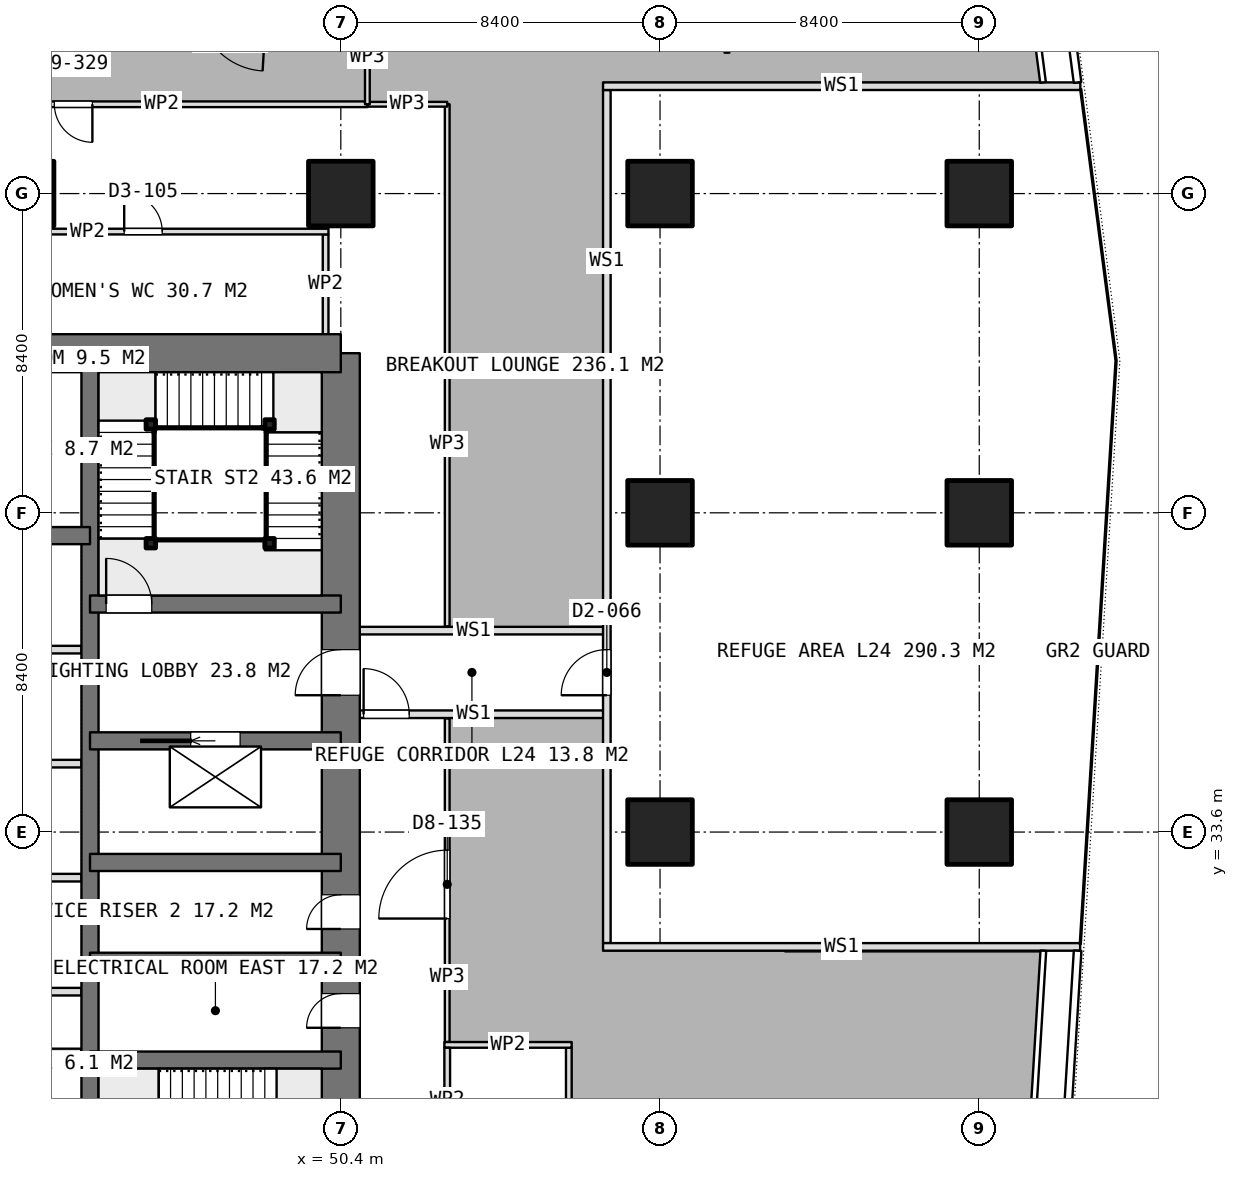
"""IFC4 building model, lengths in metres.
Left out: names, types, materials, properties, quantities, classifications, styles, units other than length and angle.
Written with IfcOpenShell. Run it as: python <this file> out.ifc"""

import sys

from ifc_helpers import new_model, si_unit, direction, frame, frame_2d, origin, origin_2d, place, context, subcontext, project, spatial, rectangle, extrude, element, fill, save


model = new_model("IFC4")
c1 = context("Model", 3, precision=1e-05, world=origin(), true_north=direction((0.0, 1.0)))
c2 = subcontext(c1, "Body", "Model", "MODEL_VIEW")
j1 = project(units=[si_unit("LENGTHUNIT", "METRE"), si_unit("PLANEANGLEUNIT", "RADIAN")], contexts=[c1])
p1 = place(None, origin())
s1 = spatial("IfcSite", under=j1, at=p1, CompositionType="ELEMENT")
p2 = place(p1, origin())
s2 = spatial("IfcBuilding", under=s1, at=p2, CompositionType="ELEMENT")
p3 = place(p2, frame((0.0, 0.0, 99.05)))
s3 = spatial("IfcBuildingStorey", under=s2, at=p3, CompositionType="ELEMENT", Elevation=99.05)
p4 = place(p3, frame((40.0, 46.2, 0.0), z_axis=(0.0, 0.0, 1.0), x_axis=(1.0, 0.0, 0.0)))
e1 = element("IfcWall", 1, at=p4, inside=s3, PredefinedType="SHEAR", context=c2, shape_type="SweptSolid", body=[
    extrude(rectangle(XDim=10.4, YDim=1.0, at=frame_2d((5.2, 0.0))), origin(), (0.0, 0.0, 1.0), 3.75),
])
p5 = place(p3, frame((50.4, 21.0, 0.0), z_axis=(0.0, 0.0, 1.0), x_axis=(0.0, 1.0, 0.0)))
e2 = element("IfcWall", 2, at=p5, inside=s3, PredefinedType="SHEAR", context=c2, shape_type="SweptSolid", body=[
    extrude(rectangle(XDim=25.2, YDim=1.0, at=frame_2d((12.6, 0.0))), origin(), (0.0, 0.0, 1.0), 3.75),
])
p6 = place(p5, frame((16.2, 0.0, 0.0)))
e3 = element("IfcOpeningElement", 3, at=p6, cuts=e2, PredefinedType="OPENING", context=c2, shape_type="SweptSolid", body=[
    extrude(rectangle(XDim=1.2, YDim=2.1, at=frame_2d((0.6, 1.05))), frame((0.0, 0.51, 0.0), z_axis=(0.0, -1.0, 0.0), x_axis=(1.0, 0.0, 0.0)), (0.0, 0.0, 1.0), 1.02),
])
p7 = place(p5, frame((10.05, 0.0, 0.0)))
e4 = element("IfcOpeningElement", 4, at=p7, cuts=e2, PredefinedType="OPENING", context=c2, shape_type="SweptSolid", body=[
    extrude(rectangle(XDim=0.9, YDim=2.1, at=frame_2d((0.45, 1.05))), frame((0.0, 0.51, 0.0), z_axis=(0.0, -1.0, 0.0), x_axis=(1.0, 0.0, 0.0)), (0.0, 0.0, 1.0), 1.02),
])
p8 = place(p5, frame((7.45, 0.0, 0.0)))
e5 = element("IfcOpeningElement", 5, at=p8, cuts=e2, PredefinedType="OPENING", context=c2, shape_type="SweptSolid", body=[
    extrude(rectangle(XDim=0.9, YDim=2.1, at=frame_2d((0.45, 1.05))), frame((0.0, 0.51, 0.0), z_axis=(0.0, -1.0, 0.0), x_axis=(1.0, 0.0, 0.0)), (0.0, 0.0, 1.0), 1.02),
])
p9 = place(p5, frame((0.7, 0.0, 0.0)))
e6 = element("IfcOpeningElement", 6, at=p9, cuts=e2, PredefinedType="OPENING", context=c2, shape_type="SweptSolid", body=[
    extrude(rectangle(XDim=1.2, YDim=2.1, at=frame_2d((0.6, 1.05))), frame((0.0, 0.51, 0.0), z_axis=(0.0, -1.0, 0.0), x_axis=(1.0, 0.0, 0.0)), (0.0, 0.0, 1.0), 1.02),
])
p10 = place(p3, frame((43.8, 21.0, 0.0), z_axis=(0.0, 0.0, 1.0), x_axis=(0.0, 1.0, 0.0)))
e7 = element("IfcWall", 7, at=p10, inside=s3, PredefinedType="SHEAR", context=c2, shape_type="SweptSolid", body=[
    extrude(rectangle(XDim=25.2, YDim=0.45, at=frame_2d((12.6, 0.0))), origin(), (0.0, 0.0, 1.0), 3.75),
])
p11 = place(p3, frame((40.0, 41.4, 0.0), z_axis=(0.0, 0.0, 1.0), x_axis=(1.0, 0.0, 0.0)))
e8 = element("IfcWall", 8, at=p11, inside=s3, PredefinedType="SHEAR", context=c2, shape_type="SweptSolid", body=[
    extrude(rectangle(XDim=3.8, YDim=0.45, at=frame_2d((1.9, 0.0))), origin(), (0.0, 0.0, 1.0), 3.75),
])
for number, where, z_axis, x_axis in (
    (9, (43.8, 27.6, 0.0), (0.0, 0.0, 1.0), (1.0, 0.0, 0.0)),
    (10, (43.8, 30.2, 0.0), (0.0, 0.0, 1.0), (1.0, 0.0, 0.0)),
    (11, (43.8, 32.8, 0.0), (0.0, 0.0, 1.0), (1.0, 0.0, 0.0)),
):
    element("IfcWall", number, at=place(p3, frame(where, z_axis=z_axis, x_axis=x_axis)), inside=s3, PredefinedType="SHEAR", context=c2, shape_type="SweptSolid", body=[
        extrude(rectangle(XDim=6.6, YDim=0.45, at=frame_2d((3.3, 0.0))), origin(), (0.0, 0.0, 1.0), 3.75),
    ])
p12 = place(p3, frame((43.8, 36.0, 0.0), z_axis=(0.0, 0.0, 1.0), x_axis=(1.0, 0.0, 0.0)))
e12 = element("IfcWall", 12, at=p12, inside=s3, PredefinedType="SHEAR", context=c2, shape_type="SweptSolid", body=[
    extrude(rectangle(XDim=6.6, YDim=0.45, at=frame_2d((3.3, 0.0))), origin(), (0.0, 0.0, 1.0), 3.75),
])
p13 = place(p12, frame((2.65, 0.0, 0.0)))
e13 = element("IfcOpeningElement", 13, at=p13, cuts=e12, PredefinedType="OPENING", context=c2, shape_type="SweptSolid", body=[
    extrude(rectangle(XDim=1.3, YDim=2.1, at=frame_2d((0.65, 1.05))), frame((0.0, 0.235, 0.0), z_axis=(0.0, -1.0, 0.0), x_axis=(1.0, 0.0, 0.0)), (0.0, 0.0, 1.0), 0.47),
])
p14 = place(p3, frame((43.8, 39.6, 0.0), z_axis=(0.0, 0.0, 1.0), x_axis=(1.0, 0.0, 0.0)))
e14 = element("IfcWall", 14, at=p14, inside=s3, PredefinedType="SHEAR", context=c2, shape_type="SweptSolid", body=[
    extrude(rectangle(XDim=6.6, YDim=0.45, at=frame_2d((3.3, 0.0))), origin(), (0.0, 0.0, 1.0), 3.75),
])
p15 = place(p14, frame((0.425, 0.0, 0.0)))
e15 = element("IfcOpeningElement", 15, at=p15, cuts=e14, PredefinedType="OPENING", context=c2, shape_type="SweptSolid", body=[
    extrude(rectangle(XDim=1.2, YDim=2.1, at=frame_2d((0.6, 1.05))), frame((0.0, 0.235, 0.0), z_axis=(0.0, -1.0, 0.0), x_axis=(1.0, 0.0, 0.0)), (0.0, 0.0, 1.0), 0.47),
])
for number, where, z_axis, x_axis in (
    (16, (42.0, 50.4, 0.0), (0.0, 0.0, 1.0), (1.0, 0.0, 0.0)),
    (17, (50.4, 50.4, 0.0), (0.0, 0.0, 1.0), (1.0, 0.0, 0.0)),
    (18, (58.8, 33.6, 0.0), (0.0, 0.0, 1.0), (1.0, 0.0, 0.0)),
    (19, (58.8, 42.0, 0.0), (0.0, 0.0, 1.0), (1.0, 0.0, 0.0)),
    (20, (58.8, 50.4, 0.0), (0.0, 0.0, 1.0), (1.0, 0.0, 0.0)),
    (21, (67.2, 33.6, 0.0), (0.0, 0.0, 1.0), (1.0, 0.0, 0.0)),
    (22, (67.2, 42.0, 0.0), (0.0, 0.0, 1.0), (1.0, 0.0, 0.0)),
    (23, (67.2, 50.4, 0.0), (0.0, 0.0, 1.0), (1.0, 0.0, 0.0)),
):
    element("IfcColumn", number, at=place(p3, frame(where, z_axis=z_axis, x_axis=x_axis)), inside=s3, PredefinedType="COLUMN", context=c2, shape_type="SweptSolid", body=[
        extrude(rectangle(XDim=1.7, YDim=1.7, at=origin_2d()), origin(), (0.0, 0.0, 1.0), 3.75),
    ])
for number, where, z_axis, x_axis in (
    (24, (40.5, 29.4, 0.0), (0.0, 0.0, 1.0), (1.0, 0.0, 0.0)),
    (25, (40.5, 32.4, 0.0), (0.0, 0.0, 1.0), (1.0, 0.0, 0.0)),
    (26, (40.5, 35.4, 0.0), (0.0, 0.0, 1.0), (1.0, 0.0, 0.0)),
    (27, (40.5, 38.4, 0.0), (0.0, 0.0, 1.0), (1.0, 0.0, 0.0)),
    (28, (40.5, 27.8, 0.0), (0.0, 0.0, 1.0), (1.0, 0.0, 0.0)),
):
    element("IfcWall", number, at=place(p3, frame(where, z_axis=z_axis, x_axis=x_axis)), inside=s3, PredefinedType="PARTITIONING", context=c2, shape_type="SweptSolid", body=[
        extrude(rectangle(XDim=3.075, YDim=0.2, at=frame_2d((1.538, 0.0))), origin(), (0.0, 0.0, 1.0), 3.5),
    ])
p16 = place(p3, frame((40.0, 43.7, 0.0), z_axis=(0.0, 0.0, 1.0), x_axis=(1.0, 0.0, 0.0)))
e29 = element("IfcWall", 29, at=p16, inside=s3, PredefinedType="PARTITIONING", context=c2, shape_type="SweptSolid", body=[
    extrude(rectangle(XDim=3.575, YDim=0.2, at=frame_2d((1.788, 0.0))), origin(), (0.0, 0.0, 1.0), 3.5),
])
p17 = place(p3, frame((40.325, 49.4, 0.0), z_axis=(0.0, 0.0, 1.0), x_axis=(1.0, 0.0, 0.0)))
e30 = element("IfcWall", 30, at=p17, inside=s3, PredefinedType="PARTITIONING", context=c2, shape_type="SweptSolid", body=[
    extrude(rectangle(XDim=9.75, YDim=0.15, at=frame_2d((4.875, 0.0))), origin(), (0.0, 0.0, 1.0), 3.5),
])
p18 = place(p17, frame((4.375, 0.0, 0.0)))
e31 = element("IfcOpeningElement", 31, at=p18, cuts=e30, PredefinedType="OPENING", context=c2, shape_type="SweptSolid", body=[
    extrude(rectangle(XDim=1.0, YDim=2.1, at=frame_2d((0.5, 1.05))), frame((0.0, 0.085, 0.0), z_axis=(0.0, -1.0, 0.0), x_axis=(1.0, 0.0, 0.0)), (0.0, 0.0, 1.0), 0.17),
])
p19 = place(p3, frame((50.0, 46.7, 0.0), z_axis=(0.0, 0.0, 1.0), x_axis=(0.0, 1.0, 0.0)))
e32 = element("IfcWall", 32, at=p19, inside=s3, PredefinedType="PARTITIONING", context=c2, shape_type="SweptSolid", body=[
    extrude(rectangle(XDim=2.625, YDim=0.15, at=frame_2d((1.312, 0.0))), origin(), (0.0, 0.0, 1.0), 3.5),
])
p20 = place(p3, frame((53.125, 28.0, 0.0), z_axis=(0.0, 0.0, 1.0), x_axis=(1.0, 0.0, 0.0)))
e33 = element("IfcWall", 33, at=p20, inside=s3, PredefinedType="PARTITIONING", context=c2, shape_type="SweptSolid", body=[
    extrude(rectangle(XDim=3.35, YDim=0.15, at=frame_2d((1.675, 0.0))), origin(), (0.0, 0.0, 1.0), 3.5),
])
p21 = place(p3, frame((53.2, 21.075, 0.0), z_axis=(0.0, 0.0, 1.0), x_axis=(0.0, 1.0, 0.0)))
e34 = element("IfcWall", 34, at=p21, inside=s3, PredefinedType="PARTITIONING", context=c2, shape_type="SweptSolid", body=[
    extrude(rectangle(XDim=6.85, YDim=0.15, at=frame_2d((3.425, 0.0))), origin(), (0.0, 0.0, 1.0), 3.5),
])
p22 = place(p21, frame((2.925, 0.0, 0.0)))
e35 = element("IfcOpeningElement", 35, at=p22, cuts=e34, PredefinedType="OPENING", context=c2, shape_type="SweptSolid", body=[
    extrude(rectangle(XDim=1.0, YDim=2.1, at=frame_2d((0.5, 1.05))), frame((0.0, 0.085, 0.0), z_axis=(0.0, -1.0, 0.0), x_axis=(1.0, 0.0, 0.0)), (0.0, 0.0, 1.0), 0.17),
])
p23 = place(p3, frame((56.4, 21.075, 0.0), z_axis=(0.0, 0.0, 1.0), x_axis=(0.0, 1.0, 0.0)))
e36 = element("IfcWall", 36, at=p23, inside=s3, PredefinedType="PARTITIONING", context=c2, shape_type="SweptSolid", body=[
    extrude(rectangle(XDim=6.85, YDim=0.15, at=frame_2d((3.425, 0.0))), origin(), (0.0, 0.0, 1.0), 3.5),
])
p24 = place(p3, frame((53.2, 28.075, 0.0), z_axis=(0.0, 0.0, 1.0), x_axis=(0.0, 1.0, 0.0)))
e37 = element("IfcWall", 37, at=p24, inside=s3, PredefinedType="PARTITIONING", context=c2, shape_type="SweptSolid", body=[
    extrude(rectangle(XDim=8.514, YDim=0.125, at=frame_2d((4.257, 0.0))), origin(), (0.0, 0.0, 1.0), 3.5),
])
p25 = place(p24, frame((3.249, 0.0, 0.0)))
e38 = element("IfcOpeningElement", 38, at=p25, cuts=e37, PredefinedType="OPENING", context=c2, shape_type="SweptSolid", body=[
    extrude(rectangle(XDim=1.8, YDim=2.1, at=frame_2d((0.9, 1.05))), frame((0.0, 0.073, 0.0), z_axis=(0.0, -1.0, 0.0), x_axis=(1.0, 0.0, 0.0)), (0.0, 0.0, 1.0), 0.145),
])
p26 = place(p3, frame((60.561, 60.827, 0.0), z_axis=(0.0, 0.0, 1.0), x_axis=(0.0, -1.0, 0.0)))
e39 = element("IfcWall", 39, at=p26, inside=s3, PredefinedType="PARTITIONING", context=c2, shape_type="SweptSolid", body=[
    extrude(rectangle(XDim=6.72, YDim=0.125, at=frame_2d((3.36, 0.0))), origin(), (0.0, 0.0, 1.0), 3.5),
])
p27 = place(p3, frame((53.2, 39.011, 0.0), z_axis=(0.0, 0.0, 1.0), x_axis=(0.0, 1.0, 0.0)))
e40 = element("IfcWall", 40, at=p27, inside=s3, PredefinedType="PARTITIONING", context=c2, shape_type="SweptSolid", body=[
    extrude(rectangle(XDim=13.739, YDim=0.125, at=frame_2d((6.87, 0.0))), origin(), (0.0, 0.0, 1.0), 3.5),
])
p28 = place(p3, frame((53.2, 52.75, 0.0), z_axis=(0.0, 0.0, 1.0), x_axis=(-1.0, 0.0, 0.0)))
e41 = element("IfcWall", 41, at=p28, inside=s3, PredefinedType="PARTITIONING", context=c2, shape_type="SweptSolid", body=[
    extrude(rectangle(XDim=2.101, YDim=0.125, at=frame_2d((1.05, 0.0))), origin(), (0.0, 0.0, 1.0), 3.5),
])
p29 = place(p3, frame((51.099, 52.75, 0.0), z_axis=(0.0, 0.0, 1.0), x_axis=(0.0, 1.0, 0.0)))
e42 = element("IfcWall", 42, at=p29, inside=s3, PredefinedType="PARTITIONING", context=c2, shape_type="SweptSolid", body=[
    extrude(rectangle(XDim=2.514, YDim=0.125, at=frame_2d((1.257, 0.0))), origin(), (0.0, 0.0, 1.0), 3.5),
])
p30 = place(p3, frame((51.099, 52.75, 0.0), z_axis=(0.0, 0.0, 1.0), x_axis=(-1.0, 0.0, 0.0)))
e43 = element("IfcWall", 43, at=p30, inside=s3, PredefinedType="PARTITIONING", context=c2, shape_type="SweptSolid", body=[
    extrude(rectangle(XDim=15.473, YDim=0.15, at=frame_2d((7.737, 0.0))), origin(), (0.0, 0.0, 1.0), 3.5),
])
p31 = place(p30, frame((7.236, 0.0, 0.0)))
e44 = element("IfcOpeningElement", 44, at=p31, cuts=e43, PredefinedType="OPENING", context=c2, shape_type="SweptSolid", body=[
    extrude(rectangle(XDim=1.0, YDim=2.1, at=frame_2d((0.5, 1.05))), frame((0.0, 0.085, 0.0), z_axis=(0.0, -1.0, 0.0), x_axis=(1.0, 0.0, 0.0)), (0.0, 0.0, 1.0), 0.17),
])
for number, where, z_axis, x_axis in (
    (45, (45.4, 41.2, 0.0), (0.0, 0.0, 1.0), (1.0, 0.0, 0.0)),
    (46, (45.4, 44.325, 0.0), (0.0, 0.0, 1.0), (1.0, 0.0, 0.0)),
    (47, (48.525, 44.325, 0.0), (0.0, 0.0, 1.0), (1.0, 0.0, 0.0)),
    (48, (48.525, 41.2, 0.0), (0.0, 0.0, 1.0), (1.0, 0.0, 0.0)),
):
    element("IfcColumn", number, at=place(p3, frame(where, z_axis=z_axis, x_axis=x_axis)), inside=s3, PredefinedType="COLUMN", context=c2, shape_type="SweptSolid", body=[
        extrude(rectangle(XDim=0.25, YDim=0.25, at=origin_2d()), origin(), (0.0, 0.0, 1.0), 3.75),
    ])
p32 = place(p3, frame((57.4, 30.678, 0.0), z_axis=(0.0, 0.0, 1.0), x_axis=(0.0, 1.0, 0.0)))
e49 = element("IfcWall", 49, at=p32, inside=s3, PredefinedType="PARTITIONING", context=c2, shape_type="SweptSolid", body=[
    extrude(rectangle(XDim=22.447, YDim=0.2, at=frame_2d((11.224, 0.0))), origin(), (0.0, 0.0, 1.0), 3.5),
])
p33 = place(p32, frame((6.522, 0.0, 0.0)))
e50 = element("IfcOpeningElement", 50, at=p33, cuts=e49, PredefinedType="OPENING", context=c2, shape_type="SweptSolid", body=[
    extrude(rectangle(XDim=1.2, YDim=2.1, at=frame_2d((0.6, 1.05))), frame((0.0, 0.11, 0.0), z_axis=(0.0, -1.0, 0.0), x_axis=(1.0, 0.0, 0.0)), (0.0, 0.0, 1.0), 0.22),
])
p34 = place(p3, frame((57.3, 30.578, 0.0), z_axis=(0.0, 0.0, 1.0), x_axis=(1.0, 0.0, 0.0)))
e51 = element("IfcWall", 51, at=p34, inside=s3, PredefinedType="PARTITIONING", context=c2, shape_type="SweptSolid", body=[
    extrude(rectangle(XDim=12.555, YDim=0.2, at=frame_2d((6.277, 0.0))), origin(), (0.0, 0.0, 1.0), 3.5),
])
p35 = place(p3, frame((57.3, 53.225, 0.0), z_axis=(0.0, 0.0, 1.0), x_axis=(1.0, 0.0, 0.0)))
e52 = element("IfcWall", 52, at=p35, inside=s3, PredefinedType="PARTITIONING", context=c2, shape_type="SweptSolid", body=[
    extrude(rectangle(XDim=12.56, YDim=0.2, at=frame_2d((6.28, 0.0))), origin(), (0.0, 0.0, 1.0), 3.5),
])
p36 = place(p3, frame((50.4, 38.9, 0.0), z_axis=(0.0, 0.0, 1.0), x_axis=(1.0, 0.0, 0.0)))
e53 = element("IfcWall", 53, at=p36, inside=s3, PredefinedType="PARTITIONING", context=c2, shape_type="SweptSolid", body=[
    extrude(rectangle(XDim=7.0, YDim=0.2, at=frame_2d((3.5, 0.0))), origin(), (0.0, 0.0, 1.0), 3.5),
])
p37 = place(p3, frame((50.4, 36.7, 0.0), z_axis=(0.0, 0.0, 1.0), x_axis=(1.0, 0.0, 0.0)))
e54 = element("IfcWall", 54, at=p37, inside=s3, PredefinedType="PARTITIONING", context=c2, shape_type="SweptSolid", body=[
    extrude(rectangle(XDim=7.0, YDim=0.2, at=frame_2d((3.5, 0.0))), origin(), (0.0, 0.0, 1.0), 3.5),
])
p38 = place(p37, frame((0.6, 0.0, 0.0)))
e55 = element("IfcOpeningElement", 55, at=p38, cuts=e54, PredefinedType="OPENING", context=c2, shape_type="SweptSolid", body=[
    extrude(rectangle(XDim=1.2, YDim=2.1, at=frame_2d((0.6, 1.05))), frame((0.0, 0.11, 0.0), z_axis=(0.0, -1.0, 0.0), x_axis=(1.0, 0.0, 0.0)), (0.0, 0.0, 1.0), 0.22),
])
p39 = place(p6, origin())
e56 = element("IfcDoor", 56, at=p39, inside=s3, OperationType="SINGLE_SWING_LEFT", PredefinedType="DOOR", context=c2, shape_type="SweptSolid", body=[
    extrude(rectangle(XDim=1.2, YDim=2.1, at=frame_2d((0.6, 1.05))), frame((0.0, 0.025, 0.0), z_axis=(0.0, -1.0, 0.0), x_axis=(1.0, 0.0, 0.0)), (0.0, 0.0, 1.0), 0.05),
])
fill(e3, e56)
p40 = place(p7, origin())
e57 = element("IfcDoor", 57, at=p40, inside=s3, OperationType="SINGLE_SWING_LEFT", PredefinedType="DOOR", context=c2, shape_type="SweptSolid", body=[
    extrude(rectangle(XDim=0.9, YDim=2.1, at=frame_2d((0.45, 1.05))), frame((0.0, 0.025, 0.0), z_axis=(0.0, -1.0, 0.0), x_axis=(1.0, 0.0, 0.0)), (0.0, 0.0, 1.0), 0.05),
])
fill(e4, e57)
p41 = place(p8, origin())
e58 = element("IfcDoor", 58, at=p41, inside=s3, OperationType="SINGLE_SWING_LEFT", PredefinedType="DOOR", context=c2, shape_type="SweptSolid", body=[
    extrude(rectangle(XDim=0.9, YDim=2.1, at=frame_2d((0.45, 1.05))), frame((0.0, 0.025, 0.0), z_axis=(0.0, -1.0, 0.0), x_axis=(1.0, 0.0, 0.0)), (0.0, 0.0, 1.0), 0.05),
])
fill(e5, e58)
p42 = place(p13, origin())
e59 = element("IfcDoor", 59, at=p42, inside=s3, OperationType="SLIDING_TO_LEFT", PredefinedType="USERDEFINED", context=c2, shape_type="SweptSolid", body=[
    extrude(rectangle(XDim=1.3, YDim=2.1, at=frame_2d((0.65, 1.05))), frame((0.0, 0.025, 0.0), z_axis=(0.0, -1.0, 0.0), x_axis=(1.0, 0.0, 0.0)), (0.0, 0.0, 1.0), 0.05),
])
fill(e13, e59)
p43 = place(p18, origin())
e60 = element("IfcDoor", 60, at=p43, inside=s3, OperationType="SINGLE_SWING_LEFT", PredefinedType="DOOR", context=c2, shape_type="SweptSolid", body=[
    extrude(rectangle(XDim=1.0, YDim=2.1, at=frame_2d((0.5, 1.05))), frame((0.0, 0.025, 0.0), z_axis=(0.0, -1.0, 0.0), x_axis=(1.0, 0.0, 0.0)), (0.0, 0.0, 1.0), 0.05),
])
fill(e31, e60)
p44 = place(p25, origin())
e61 = element("IfcDoor", 61, at=p44, inside=s3, OperationType="DOUBLE_DOOR_SINGLE_SWING", PredefinedType="DOOR", context=c2, shape_type="SweptSolid", body=[
    extrude(rectangle(XDim=1.8, YDim=2.1, at=frame_2d((0.9, 1.05))), frame((0.0, 0.025, 0.0), z_axis=(0.0, -1.0, 0.0), x_axis=(1.0, 0.0, 0.0)), (0.0, 0.0, 1.0), 0.05),
])
fill(e38, e61)
p45 = place(p31, origin())
e62 = element("IfcDoor", 62, at=p45, inside=s3, OperationType="SINGLE_SWING_LEFT", PredefinedType="DOOR", context=c2, shape_type="SweptSolid", body=[
    extrude(rectangle(XDim=1.0, YDim=2.1, at=frame_2d((0.5, 1.05))), frame((0.0, 0.025, 0.0), z_axis=(0.0, -1.0, 0.0), x_axis=(1.0, 0.0, 0.0)), (0.0, 0.0, 1.0), 0.05),
])
fill(e44, e62)
p46 = place(p15, origin())
e63 = element("IfcDoor", 63, at=p46, inside=s3, OperationType="SINGLE_SWING_RIGHT", PredefinedType="DOOR", context=c2, shape_type="SweptSolid", body=[
    extrude(rectangle(XDim=1.2, YDim=2.1, at=frame_2d((0.6, 1.05))), frame((0.0, 0.025, 0.0), z_axis=(0.0, -1.0, 0.0), x_axis=(1.0, 0.0, 0.0)), (0.0, 0.0, 1.0), 0.05),
])
fill(e15, e63)
p47 = place(p33, origin())
e64 = element("IfcDoor", 64, at=p47, inside=s3, OperationType="SINGLE_SWING_LEFT", PredefinedType="DOOR", context=c2, shape_type="SweptSolid", body=[
    extrude(rectangle(XDim=1.2, YDim=2.1, at=frame_2d((0.6, 1.05))), frame((0.0, 0.025, 0.0), z_axis=(0.0, -1.0, 0.0), x_axis=(1.0, 0.0, 0.0)), (0.0, 0.0, 1.0), 0.05),
])
fill(e50, e64)
p48 = place(p38, origin())
e65 = element("IfcDoor", 65, at=p48, inside=s3, OperationType="SINGLE_SWING_LEFT", PredefinedType="DOOR", context=c2, shape_type="SweptSolid", body=[
    extrude(rectangle(XDim=1.2, YDim=2.1, at=frame_2d((0.6, 1.05))), frame((0.0, 0.025, 0.0), z_axis=(0.0, -1.0, 0.0), x_axis=(1.0, 0.0, 0.0)), (0.0, 0.0, 1.0), 0.05),
])
fill(e55, e65)
save(model, sys.argv[1])
